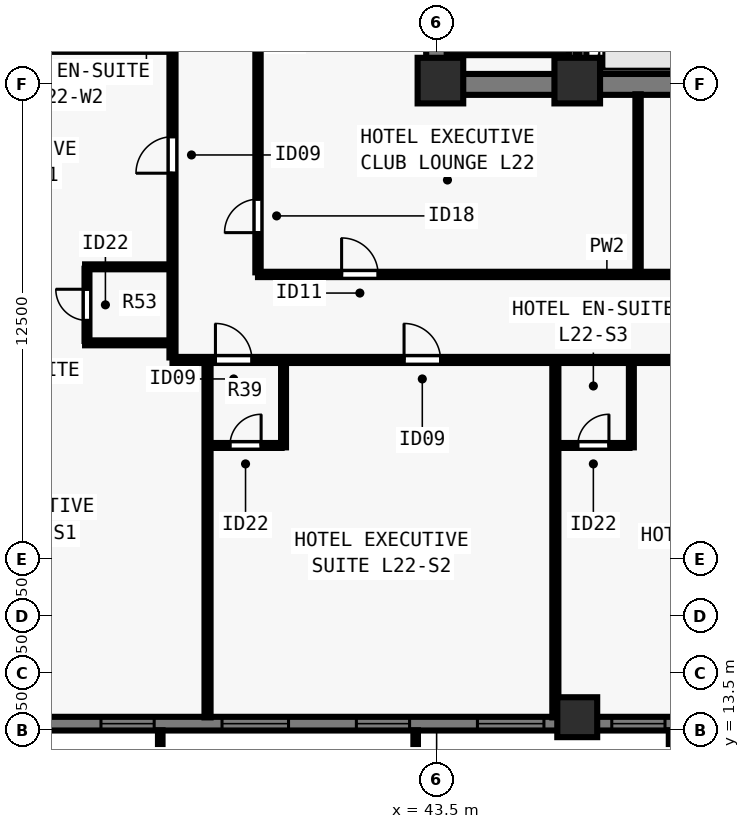
"""IFC4 building model, lengths in metres.
Left out: names, types, materials, properties, quantities, classifications, styles, units other than length and angle.
Written with IfcOpenShell. Run it as: python <this file> out.ifc"""

import sys

from ifc_helpers import new_model, si_unit, direction, frame, frame_2d, origin, origin_2d, place, context, subcontext, project, spatial, rectangle, extrude, element, fill, save


model = new_model("IFC4")
c1 = context("Model", 3, precision=1e-05, world=origin(), true_north=direction((0.0, 1.0)))
c2 = subcontext(c1, "Body", "Model", "MODEL_VIEW")
j1 = project(units=[si_unit("LENGTHUNIT", "METRE"), si_unit("PLANEANGLEUNIT", "RADIAN")], contexts=[c1])
p1 = place(None, origin())
s1 = spatial("IfcSite", under=j1, at=p1, CompositionType="ELEMENT")
p2 = place(p1, origin())
s2 = spatial("IfcBuilding", under=s1, at=p2, CompositionType="ELEMENT")
p3 = place(p2, frame((0.0, 0.0, 83.0)))
s3 = spatial("IfcBuildingStorey", under=s2, at=p3, CompositionType="ELEMENT", Elevation=83.0)
for number, where, z_axis, x_axis in (
    (1, (43.6, 30.6, 0.0), (0.0, 0.0, 1.0), (1.0, 0.0, 0.0)),
    (2, (47.2, 30.6, 0.0), (0.0, 0.0, 1.0), (1.0, 0.0, 0.0)),
):
    element("IfcColumn", number, at=place(p3, frame(where, z_axis=z_axis, x_axis=x_axis)), inside=s3, PredefinedType="COLUMN", context=c2, shape_type="SweptSolid", body=[
        extrude(rectangle(XDim=1.2, YDim=1.2, at=origin_2d()), origin(), (0.0, 0.0, 1.0), 3.5),
    ])
p4 = place(p3, frame((47.2, 13.85, 0.0), z_axis=(0.0, 0.0, 1.0), x_axis=(1.0, 0.0, 0.0)))
e3 = element("IfcColumn", 3, at=p4, inside=s3, PredefinedType="COLUMN", context=c2, shape_type="SweptSolid", body=[
    extrude(rectangle(XDim=1.05, YDim=1.05, at=origin_2d()), origin(), (0.0, 0.0, 1.0), 3.5),
])
p5 = place(p3, frame((74.5, 13.68, 0.0), z_axis=(0.0, 0.0, 1.0), x_axis=(-1.0, 0.0, 0.0)))
e4 = element("IfcWall", 4, at=p5, inside=s3, PredefinedType="SOLIDWALL", context=c2, shape_type="SweptSolid", body=[
    extrude(rectangle(XDim=44.662, YDim=0.36, at=frame_2d((22.331, 0.0))), origin(), (0.0, 0.0, 1.0), 3.28),
])
p6 = place(p5, frame((4.83, 0.0, 0.8)))
e5 = element("IfcOpeningElement", 5, at=p6, cuts=e4, PredefinedType="OPENING", context=c2, shape_type="SweptSolid", body=[
    extrude(rectangle(XDim=1.4, YDim=1.544, at=frame_2d((0.7, 0.772))), frame((0.0, 0.19, 0.0), z_axis=(0.0, -1.0, 0.0), x_axis=(1.0, 0.0, 0.0)), (0.0, 0.0, 1.0), 0.38),
])
p7 = place(p5, frame((8.465, 0.0, 0.8)))
e6 = element("IfcOpeningElement", 6, at=p7, cuts=e4, PredefinedType="OPENING", context=c2, shape_type="SweptSolid", body=[
    extrude(rectangle(XDim=1.75, YDim=1.544, at=frame_2d((0.875, 0.772))), frame((0.0, 0.19, 0.0), z_axis=(0.0, -1.0, 0.0), x_axis=(1.0, 0.0, 0.0)), (0.0, 0.0, 1.0), 0.38),
])
p8 = place(p5, frame((11.551, 0.0, 0.8)))
e7 = element("IfcOpeningElement", 7, at=p8, cuts=e4, PredefinedType="OPENING", context=c2, shape_type="SweptSolid", body=[
    extrude(rectangle(XDim=1.4, YDim=1.544, at=frame_2d((0.7, 0.772))), frame((0.0, 0.19, 0.0), z_axis=(0.0, -1.0, 0.0), x_axis=(1.0, 0.0, 0.0)), (0.0, 0.0, 1.0), 0.38),
])
p9 = place(p5, frame((14.736, 0.0, 0.8)))
e8 = element("IfcOpeningElement", 8, at=p9, cuts=e4, PredefinedType="OPENING", context=c2, shape_type="SweptSolid", body=[
    extrude(rectangle(XDim=1.75, YDim=1.544, at=frame_2d((0.875, 0.772))), frame((0.0, 0.19, 0.0), z_axis=(0.0, -1.0, 0.0), x_axis=(1.0, 0.0, 0.0)), (0.0, 0.0, 1.0), 0.38),
])
p10 = place(p5, frame((18.721, 0.0, 0.8)))
e9 = element("IfcOpeningElement", 9, at=p10, cuts=e4, PredefinedType="OPENING", context=c2, shape_type="SweptSolid", body=[
    extrude(rectangle(XDim=1.4, YDim=1.544, at=frame_2d((0.7, 0.772))), frame((0.0, 0.19, 0.0), z_axis=(0.0, -1.0, 0.0), x_axis=(1.0, 0.0, 0.0)), (0.0, 0.0, 1.0), 0.38),
])
p11 = place(p5, frame((21.456, 0.0, 0.8)))
e10 = element("IfcOpeningElement", 10, at=p11, cuts=e4, PredefinedType="OPENING", context=c2, shape_type="SweptSolid", body=[
    extrude(rectangle(XDim=1.75, YDim=1.544, at=frame_2d((0.875, 0.772))), frame((0.0, 0.19, 0.0), z_axis=(0.0, -1.0, 0.0), x_axis=(1.0, 0.0, 0.0)), (0.0, 0.0, 1.0), 0.38),
])
p12 = place(p5, frame((24.991, 0.0, 0.8)))
e11 = element("IfcOpeningElement", 11, at=p12, cuts=e4, PredefinedType="OPENING", context=c2, shape_type="SweptSolid", body=[
    extrude(rectangle(XDim=1.4, YDim=1.544, at=frame_2d((0.7, 0.772))), frame((0.0, 0.19, 0.0), z_axis=(0.0, -1.0, 0.0), x_axis=(1.0, 0.0, 0.0)), (0.0, 0.0, 1.0), 0.38),
])
p13 = place(p5, frame((28.177, 0.0, 0.8)))
e12 = element("IfcOpeningElement", 12, at=p13, cuts=e4, PredefinedType="OPENING", context=c2, shape_type="SweptSolid", body=[
    extrude(rectangle(XDim=1.75, YDim=1.544, at=frame_2d((0.875, 0.772))), frame((0.0, 0.19, 0.0), z_axis=(0.0, -1.0, 0.0), x_axis=(1.0, 0.0, 0.0)), (0.0, 0.0, 1.0), 0.38),
])
p14 = place(p5, frame((31.711, 0.0, 0.8)))
e13 = element("IfcOpeningElement", 13, at=p14, cuts=e4, PredefinedType="OPENING", context=c2, shape_type="SweptSolid", body=[
    extrude(rectangle(XDim=1.4, YDim=1.544, at=frame_2d((0.7, 0.772))), frame((0.0, 0.19, 0.0), z_axis=(0.0, -1.0, 0.0), x_axis=(1.0, 0.0, 0.0)), (0.0, 0.0, 1.0), 0.38),
])
p15 = place(p5, frame((34.897, 0.0, 0.8)))
e14 = element("IfcOpeningElement", 14, at=p15, cuts=e4, PredefinedType="OPENING", context=c2, shape_type="SweptSolid", body=[
    extrude(rectangle(XDim=1.75, YDim=1.544, at=frame_2d((0.875, 0.772))), frame((0.0, 0.19, 0.0), z_axis=(0.0, -1.0, 0.0), x_axis=(1.0, 0.0, 0.0)), (0.0, 0.0, 1.0), 0.38),
])
p16 = place(p5, frame((38.432, 0.0, 0.8)))
e15 = element("IfcOpeningElement", 15, at=p16, cuts=e4, PredefinedType="OPENING", context=c2, shape_type="SweptSolid", body=[
    extrude(rectangle(XDim=1.4, YDim=1.544, at=frame_2d((0.7, 0.772))), frame((0.0, 0.19, 0.0), z_axis=(0.0, -1.0, 0.0), x_axis=(1.0, 0.0, 0.0)), (0.0, 0.0, 1.0), 0.38),
])
p17 = place(p3, frame((43.225, 30.5, 0.0), z_axis=(0.0, 0.0, 1.0), x_axis=(1.0, 0.0, 0.0)))
e16 = element("IfcWall", 16, at=p17, inside=s3, PredefinedType="SHEAR", context=c2, shape_type="SweptSolid", body=[
    extrude(rectangle(XDim=17.55, YDim=0.55, at=frame_2d((8.775, 0.0))), origin(), (0.0, 0.0, 1.0), 3.28),
])
p18 = place(p3, frame((43.5, 30.765, 0.0), z_axis=(0.0, 0.0, 1.0), x_axis=(0.0, 1.0, 0.0)))
e17 = element("IfcWall", 17, at=p18, inside=s3, PredefinedType="SHEAR", context=c2, shape_type="SweptSolid", body=[
    extrude(rectangle(XDim=7.985, YDim=0.55, at=frame_2d((3.993, 0.0))), origin(), (0.0, 0.0, 1.0), 3.28),
])
p19 = place(p3, frame((47.35, 30.76, 0.0), z_axis=(0.0, 0.0, 1.0), x_axis=(0.0, 1.0, 0.0)))
e18 = element("IfcWall", 18, at=p19, inside=s3, PredefinedType="SOLIDWALL", context=c2, shape_type="SweptSolid", body=[
    extrude(rectangle(XDim=7.855, YDim=0.18, at=frame_2d((3.927, 0.0))), origin(), (0.0, 0.0, 1.0), 3.28),
])
p20 = place(p3, frame((36.55, 23.25, 0.0), z_axis=(0.0, 0.0, 1.0), x_axis=(1.0, 0.0, 0.0)))
e19 = element("IfcWall", 19, at=p20, inside=s3, PredefinedType="PARTITIONING", context=c2, shape_type="SweptSolid", body=[
    extrude(rectangle(XDim=30.9, YDim=0.16, at=frame_2d((15.45, 0.0))), origin(), (0.0, 0.0, 1.0), 3.28),
])
p21 = place(p20, frame((1.13, 0.0, 0.0)))
e20 = element("IfcOpeningElement", 20, at=p21, cuts=e19, PredefinedType="OPENING", context=c2, shape_type="SweptSolid", body=[
    extrude(rectangle(XDim=0.96, YDim=2.15, at=frame_2d((0.48, 1.075))), frame((0.0, 0.09, 0.0), z_axis=(0.0, -1.0, 0.0), x_axis=(1.0, 0.0, 0.0)), (0.0, 0.0, 1.0), 0.18),
])
p22 = place(p20, frame((6.093, 0.0, 0.0)))
e21 = element("IfcOpeningElement", 21, at=p22, cuts=e19, PredefinedType="OPENING", context=c2, shape_type="SweptSolid", body=[
    extrude(rectangle(XDim=0.96, YDim=2.15, at=frame_2d((0.48, 1.075))), frame((0.0, 0.09, 0.0), z_axis=(0.0, -1.0, 0.0), x_axis=(1.0, 0.0, 0.0)), (0.0, 0.0, 1.0), 0.18),
])
p23 = place(p20, frame((16.125, 0.0, 0.0)))
e22 = element("IfcOpeningElement", 22, at=p23, cuts=e19, PredefinedType="OPENING", context=c2, shape_type="SweptSolid", body=[
    extrude(rectangle(XDim=0.96, YDim=2.15, at=frame_2d((0.48, 1.075))), frame((0.0, 0.09, 0.0), z_axis=(0.0, -1.0, 0.0), x_axis=(1.0, 0.0, 0.0)), (0.0, 0.0, 1.0), 0.18),
])
p24 = place(p20, frame((26.157, 0.0, 0.0)))
e23 = element("IfcOpeningElement", 23, at=p24, cuts=e19, PredefinedType="OPENING", context=c2, shape_type="SweptSolid", body=[
    extrude(rectangle(XDim=0.96, YDim=2.15, at=frame_2d((0.48, 1.075))), frame((0.0, 0.09, 0.0), z_axis=(0.0, -1.0, 0.0), x_axis=(1.0, 0.0, 0.0)), (0.0, 0.0, 1.0), 0.18),
])
p25 = place(p20, frame((28.92, 0.0, 0.0)))
e24 = element("IfcOpeningElement", 24, at=p25, cuts=e19, PredefinedType="OPENING", context=c2, shape_type="SweptSolid", body=[
    extrude(rectangle(XDim=0.96, YDim=2.15, at=frame_2d((0.48, 1.075))), frame((0.0, 0.09, 0.0), z_axis=(0.0, -1.0, 0.0), x_axis=(1.0, 0.0, 0.0)), (0.0, 0.0, 1.0), 0.18),
])
p26 = place(p3, frame((36.55, 23.315, 0.0), z_axis=(0.0, 0.0, 1.0), x_axis=(0.0, 1.0, 0.0)))
e25 = element("IfcWall", 25, at=p26, inside=s3, PredefinedType="PARTITIONING", context=c2, shape_type="SweptSolid", body=[
    extrude(rectangle(XDim=31.37, YDim=0.16, at=frame_2d((15.685, 0.0))), origin(), (0.0, 0.0, 1.0), 3.28),
])
p27 = place(p26, frame((4.848, 0.0, 0.0)))
e26 = element("IfcOpeningElement", 26, at=p27, cuts=e25, PredefinedType="OPENING", context=c2, shape_type="SweptSolid", body=[
    extrude(rectangle(XDim=0.96, YDim=2.15, at=frame_2d((0.48, 1.075))), frame((0.0, 0.09, 0.0), z_axis=(0.0, -1.0, 0.0), x_axis=(1.0, 0.0, 0.0)), (0.0, 0.0, 1.0), 0.18),
])
p28 = place(p26, frame((12.39, 0.0, 0.0)))
e27 = element("IfcOpeningElement", 27, at=p28, cuts=e25, PredefinedType="OPENING", context=c2, shape_type="SweptSolid", body=[
    extrude(rectangle(XDim=0.96, YDim=2.15, at=frame_2d((0.48, 1.075))), frame((0.0, 0.09, 0.0), z_axis=(0.0, -1.0, 0.0), x_axis=(1.0, 0.0, 0.0)), (0.0, 0.0, 1.0), 0.18),
])
p29 = place(p26, frame((20.265, 0.0, 0.0)))
e28 = element("IfcOpeningElement", 28, at=p29, cuts=e25, PredefinedType="OPENING", context=c2, shape_type="SweptSolid", body=[
    extrude(rectangle(XDim=0.96, YDim=2.15, at=frame_2d((0.48, 1.075))), frame((0.0, 0.09, 0.0), z_axis=(0.0, -1.0, 0.0), x_axis=(1.0, 0.0, 0.0)), (0.0, 0.0, 1.0), 0.18),
])
p30 = place(p26, frame((28.223, 0.0, 0.0)))
e29 = element("IfcOpeningElement", 29, at=p30, cuts=e25, PredefinedType="OPENING", context=c2, shape_type="SweptSolid", body=[
    extrude(rectangle(XDim=0.96, YDim=2.15, at=frame_2d((0.48, 1.075))), frame((0.0, 0.09, 0.0), z_axis=(0.0, -1.0, 0.0), x_axis=(1.0, 0.0, 0.0)), (0.0, 0.0, 1.0), 0.18),
])
p31 = place(p3, frame((38.8, 25.5, 0.0), z_axis=(0.0, 0.0, 1.0), x_axis=(1.0, 0.0, 0.0)))
e30 = element("IfcWall", 30, at=p31, inside=s3, PredefinedType="PARTITIONING", context=c2, shape_type="SweptSolid", body=[
    extrude(rectangle(XDim=26.4, YDim=0.14, at=frame_2d((13.2, 0.0))), origin(), (0.0, 0.0, 1.0), 3.28),
])
p32 = place(p31, frame((2.2, 0.0, 0.0)))
e31 = element("IfcOpeningElement", 31, at=p32, cuts=e30, PredefinedType="OPENING", context=c2, shape_type="SweptSolid", body=[
    extrude(rectangle(XDim=0.96, YDim=2.12, at=frame_2d((0.48, 1.06))), frame((0.0, 0.08, 0.0), z_axis=(0.0, -1.0, 0.0), x_axis=(1.0, 0.0, 0.0)), (0.0, 0.0, 1.0), 0.16),
])
p33 = place(p31, frame((15.2, 0.0, 0.0)))
e32 = element("IfcOpeningElement", 32, at=p33, cuts=e30, PredefinedType="OPENING", context=c2, shape_type="SweptSolid", body=[
    extrude(rectangle(XDim=0.96, YDim=2.12, at=frame_2d((0.48, 1.06))), frame((0.0, 0.08, 0.0), z_axis=(0.0, -1.0, 0.0), x_axis=(1.0, 0.0, 0.0)), (0.0, 0.0, 1.0), 0.16),
])
p34 = place(p3, frame((38.8, 25.555, 0.0), z_axis=(0.0, 0.0, 1.0), x_axis=(0.0, 1.0, 0.0)))
e33 = element("IfcWall", 33, at=p34, inside=s3, PredefinedType="PARTITIONING", context=c2, shape_type="SweptSolid", body=[
    extrude(rectangle(XDim=13.195, YDim=0.14, at=frame_2d((6.598, 0.0))), origin(), (0.0, 0.0, 1.0), 3.28),
])
p35 = place(p34, frame((1.045, 0.0, 0.0)))
e34 = element("IfcOpeningElement", 34, at=p35, cuts=e33, PredefinedType="OPENING", context=c2, shape_type="SweptSolid", body=[
    extrude(rectangle(XDim=0.88, YDim=2.1, at=frame_2d((0.44, 1.05))), frame((0.0, 0.08, 0.0), z_axis=(0.0, -1.0, 0.0), x_axis=(1.0, 0.0, 0.0)), (0.0, 0.0, 1.0), 0.16),
])
p36 = place(p34, frame((10.245, 0.0, 0.0)))
e35 = element("IfcOpeningElement", 35, at=p36, cuts=e33, PredefinedType="OPENING", context=c2, shape_type="SweptSolid", body=[
    extrude(rectangle(XDim=0.88, YDim=2.1, at=frame_2d((0.44, 1.05))), frame((0.0, 0.08, 0.0), z_axis=(0.0, -1.0, 0.0), x_axis=(1.0, 0.0, 0.0)), (0.0, 0.0, 1.0), 0.16),
])
p37 = place(p3, frame((48.8, 25.555, 0.0), z_axis=(0.0, 0.0, 1.0), x_axis=(0.0, 1.0, 0.0)))
e36 = element("IfcWall", 36, at=p37, inside=s3, PredefinedType="PARTITIONING", context=c2, shape_type="SweptSolid", body=[
    extrude(rectangle(XDim=4.685, YDim=0.14, at=frame_2d((2.343, 0.0))), origin(), (0.0, 0.0, 1.0), 3.28),
])
p38 = place(p3, frame((37.472, 13.845, 0.0), z_axis=(0.0, 0.0, 1.0), x_axis=(0.0, 1.0, 0.0)))
e37 = element("IfcWall", 37, at=p38, inside=s3, PredefinedType="PARTITIONING", context=c2, shape_type="SweptSolid", body=[
    extrude(rectangle(XDim=9.34, YDim=0.16, at=frame_2d((4.67, 0.0))), origin(), (0.0, 0.0, 1.0), 3.28),
])
p39 = place(p3, frame((39.472, 20.95, 0.0), z_axis=(0.0, 0.0, 1.0), x_axis=(0.0, 1.0, 0.0)))
e38 = element("IfcWall", 38, at=p39, inside=s3, PredefinedType="PLUMBINGWALL", context=c2, shape_type="SweptSolid", body=[
    extrude(rectangle(XDim=2.235, YDim=0.13, at=frame_2d((1.118, 0.0))), origin(), (0.0, 0.0, 1.0), 3.28),
])
p40 = place(p3, frame((37.537, 21.0, 0.0), z_axis=(0.0, 0.0, 1.0), x_axis=(1.0, 0.0, 0.0)))
e39 = element("IfcWall", 39, at=p40, inside=s3, PredefinedType="PLUMBINGWALL", context=c2, shape_type="SweptSolid", body=[
    extrude(rectangle(XDim=1.885, YDim=0.13, at=frame_2d((0.942, 0.0))), origin(), (0.0, 0.0, 1.0), 3.28),
])
p41 = place(p40, frame((0.525, 0.0, 0.0)))
e40 = element("IfcOpeningElement", 40, at=p41, cuts=e39, PredefinedType="OPENING", context=c2, shape_type="SweptSolid", body=[
    extrude(rectangle(XDim=0.82, YDim=2.1, at=frame_2d((0.41, 1.05))), frame((0.0, 0.075, 0.0), z_axis=(0.0, -1.0, 0.0), x_axis=(1.0, 0.0, 0.0)), (0.0, 0.0, 1.0), 0.15),
])
p42 = place(p3, frame((46.624, 13.845, 0.0), z_axis=(0.0, 0.0, 1.0), x_axis=(0.0, 1.0, 0.0)))
e41 = element("IfcWall", 41, at=p42, inside=s3, PredefinedType="PARTITIONING", context=c2, shape_type="SweptSolid", body=[
    extrude(rectangle(XDim=9.34, YDim=0.16, at=frame_2d((4.67, 0.0))), origin(), (0.0, 0.0, 1.0), 3.28),
])
p43 = place(p3, frame((48.624, 20.95, 0.0), z_axis=(0.0, 0.0, 1.0), x_axis=(0.0, 1.0, 0.0)))
e42 = element("IfcWall", 42, at=p43, inside=s3, PredefinedType="PLUMBINGWALL", context=c2, shape_type="SweptSolid", body=[
    extrude(rectangle(XDim=2.235, YDim=0.13, at=frame_2d((1.118, 0.0))), origin(), (0.0, 0.0, 1.0), 3.28),
])
p44 = place(p3, frame((46.689, 21.0, 0.0), z_axis=(0.0, 0.0, 1.0), x_axis=(1.0, 0.0, 0.0)))
e43 = element("IfcWall", 43, at=p44, inside=s3, PredefinedType="PLUMBINGWALL", context=c2, shape_type="SweptSolid", body=[
    extrude(rectangle(XDim=1.885, YDim=0.13, at=frame_2d((0.942, 0.0))), origin(), (0.0, 0.0, 1.0), 3.28),
])
p45 = place(p44, frame((0.525, 0.0, 0.0)))
e44 = element("IfcOpeningElement", 44, at=p45, cuts=e43, PredefinedType="OPENING", context=c2, shape_type="SweptSolid", body=[
    extrude(rectangle(XDim=0.82, YDim=2.1, at=frame_2d((0.41, 1.05))), frame((0.0, 0.075, 0.0), z_axis=(0.0, -1.0, 0.0), x_axis=(1.0, 0.0, 0.0)), (0.0, 0.0, 1.0), 0.15),
])
p46 = place(p3, frame((34.25, 23.7, 0.0), z_axis=(0.0, 0.0, 1.0), x_axis=(1.0, 0.0, 0.0)))
e45 = element("IfcWall", 45, at=p46, inside=s3, PredefinedType="PLUMBINGWALL", context=c2, shape_type="SweptSolid", body=[
    extrude(rectangle(XDim=2.235, YDim=0.13, at=frame_2d((1.118, 0.0))), origin(), (0.0, 0.0, 1.0), 2.849),
])
p47 = place(p3, frame((34.25, 25.7, 0.0), z_axis=(0.0, 0.0, 1.0), x_axis=(1.0, 0.0, 0.0)))
e46 = element("IfcWall", 46, at=p47, inside=s3, PredefinedType="PLUMBINGWALL", context=c2, shape_type="SweptSolid", body=[
    extrude(rectangle(XDim=2.235, YDim=0.13, at=frame_2d((1.118, 0.0))), origin(), (0.0, 0.0, 1.0), 3.28),
])
p48 = place(p3, frame((34.3, 23.75, 0.0), z_axis=(0.0, 0.0, 1.0), x_axis=(0.0, 1.0, 0.0)))
e47 = element("IfcWall", 47, at=p48, inside=s3, PredefinedType="PLUMBINGWALL", context=c2, shape_type="SweptSolid", body=[
    extrude(rectangle(XDim=1.9, YDim=0.13, at=frame_2d((0.95, 0.0))), origin(), (0.0, 0.0, 1.0), 3.28),
])
p49 = place(p48, frame((0.54, 0.0, 0.0)))
e48 = element("IfcOpeningElement", 48, at=p49, cuts=e47, PredefinedType="OPENING", context=c2, shape_type="SweptSolid", body=[
    extrude(rectangle(XDim=0.82, YDim=2.1, at=frame_2d((0.41, 1.05))), frame((0.0, 0.075, 0.0), z_axis=(0.0, -1.0, 0.0), x_axis=(1.0, 0.0, 0.0)), (0.0, 0.0, 1.0), 0.15),
])
p50 = place(p3, frame((43.765, 31.36, 0.0), z_axis=(0.0, 0.0, 1.0), x_axis=(1.0, 0.0, 0.0)))
e49 = element("IfcWall", 49, at=p50, inside=s3, PredefinedType="SOLIDWALL", context=c2, shape_type="SweptSolid", body=[
    extrude(rectangle(XDim=3.23, YDim=0.18, at=frame_2d((1.615, 0.0))), origin(), (0.0, 0.0, 1.0), 3.28),
])
p51 = place(p3, frame((47.07, 38.78, 0.0), z_axis=(0.0, 0.0, 1.0), x_axis=(0.0, -1.0, 0.0)))
e50 = element("IfcWall", 50, at=p51, inside=s3, PredefinedType="SOLIDWALL", context=c2, shape_type="SweptSolid", body=[
    extrude(rectangle(XDim=8.017, YDim=0.18, at=frame_2d((4.009, 0.0))), origin(), (0.0, 0.0, 1.0), 3.28),
])
p52 = place(p12, origin())
e51 = element("IfcWindow", 51, at=p52, inside=s3, PartitioningType="SINGLE_PANEL", PredefinedType="WINDOW", context=c2, shape_type="SweptSolid", body=[
    extrude(rectangle(XDim=1.4, YDim=1.544, at=frame_2d((0.7, 0.772))), frame((0.0, -0.05, 0.0), z_axis=(0.0, -1.0, 0.0), x_axis=(1.0, 0.0, 0.0)), (0.0, 0.0, 1.0), 0.06),
])
fill(e11, e51)
p53 = place(p13, origin())
e52 = element("IfcWindow", 52, at=p53, inside=s3, PartitioningType="SINGLE_PANEL", PredefinedType="WINDOW", context=c2, shape_type="SweptSolid", body=[
    extrude(rectangle(XDim=1.75, YDim=1.544, at=frame_2d((0.875, 0.772))), frame((0.0, -0.05, 0.0), z_axis=(0.0, -1.0, 0.0), x_axis=(1.0, 0.0, 0.0)), (0.0, 0.0, 1.0), 0.06),
])
fill(e12, e52)
p54 = place(p14, origin())
e53 = element("IfcWindow", 53, at=p54, inside=s3, PartitioningType="SINGLE_PANEL", PredefinedType="WINDOW", context=c2, shape_type="SweptSolid", body=[
    extrude(rectangle(XDim=1.4, YDim=1.544, at=frame_2d((0.7, 0.772))), frame((0.0, -0.05, 0.0), z_axis=(0.0, -1.0, 0.0), x_axis=(1.0, 0.0, 0.0)), (0.0, 0.0, 1.0), 0.06),
])
fill(e13, e53)
p55 = place(p15, origin())
e54 = element("IfcWindow", 54, at=p55, inside=s3, PartitioningType="SINGLE_PANEL", PredefinedType="WINDOW", context=c2, shape_type="SweptSolid", body=[
    extrude(rectangle(XDim=1.75, YDim=1.544, at=frame_2d((0.875, 0.772))), frame((0.0, -0.05, 0.0), z_axis=(0.0, -1.0, 0.0), x_axis=(1.0, 0.0, 0.0)), (0.0, 0.0, 1.0), 0.06),
])
fill(e14, e54)
p56 = place(p16, origin())
e55 = element("IfcWindow", 55, at=p56, inside=s3, PartitioningType="SINGLE_PANEL", PredefinedType="WINDOW", context=c2, shape_type="SweptSolid", body=[
    extrude(rectangle(XDim=1.4, YDim=1.544, at=frame_2d((0.7, 0.772))), frame((0.0, -0.05, 0.0), z_axis=(0.0, -1.0, 0.0), x_axis=(1.0, 0.0, 0.0)), (0.0, 0.0, 1.0), 0.06),
])
fill(e15, e55)
p57 = place(p32, origin())
e56 = element("IfcDoor", 56, at=p57, inside=s3, OperationType="SINGLE_SWING_LEFT", PredefinedType="DOOR", context=c2, shape_type="SweptSolid", body=[
    extrude(rectangle(XDim=0.96, YDim=2.12, at=frame_2d((0.48, 1.06))), frame((0.0, 0.025, 0.0), z_axis=(0.0, -1.0, 0.0), x_axis=(1.0, 0.0, 0.0)), (0.0, 0.0, 1.0), 0.05),
])
fill(e31, e56)
p58 = place(p35, origin())
e57 = element("IfcDoor", 57, at=p58, inside=s3, OperationType="SINGLE_SWING_LEFT", PredefinedType="DOOR", context=c2, shape_type="SweptSolid", body=[
    extrude(rectangle(XDim=0.88, YDim=2.1, at=frame_2d((0.44, 1.05))), frame((0.0, 0.025, 0.0), z_axis=(0.0, -1.0, 0.0), x_axis=(1.0, 0.0, 0.0)), (0.0, 0.0, 1.0), 0.05),
])
fill(e34, e57)
p59 = place(p21, origin())
e58 = element("IfcDoor", 58, at=p59, inside=s3, OperationType="SINGLE_SWING_LEFT", PredefinedType="DOOR", context=c2, shape_type="SweptSolid", body=[
    extrude(rectangle(XDim=0.96, YDim=2.15, at=frame_2d((0.48, 1.075))), frame((0.0, 0.025, 0.0), z_axis=(0.0, -1.0, 0.0), x_axis=(1.0, 0.0, 0.0)), (0.0, 0.0, 1.0), 0.05),
])
fill(e20, e58)
p60 = place(p41, origin())
e59 = element("IfcDoor", 59, at=p60, inside=s3, OperationType="SINGLE_SWING_RIGHT", PredefinedType="DOOR", context=c2, shape_type="SweptSolid", body=[
    extrude(rectangle(XDim=0.82, YDim=2.1, at=frame_2d((0.41, 1.05))), frame((0.0, 0.025, 0.0), z_axis=(0.0, -1.0, 0.0), x_axis=(1.0, 0.0, 0.0)), (0.0, 0.0, 1.0), 0.05),
])
fill(e40, e59)
p61 = place(p22, origin())
e60 = element("IfcDoor", 60, at=p61, inside=s3, OperationType="SINGLE_SWING_LEFT", PredefinedType="DOOR", context=c2, shape_type="SweptSolid", body=[
    extrude(rectangle(XDim=0.96, YDim=2.15, at=frame_2d((0.48, 1.075))), frame((0.0, 0.025, 0.0), z_axis=(0.0, -1.0, 0.0), x_axis=(1.0, 0.0, 0.0)), (0.0, 0.0, 1.0), 0.05),
])
fill(e21, e60)
p62 = place(p45, origin())
e61 = element("IfcDoor", 61, at=p62, inside=s3, OperationType="SINGLE_SWING_RIGHT", PredefinedType="DOOR", context=c2, shape_type="SweptSolid", body=[
    extrude(rectangle(XDim=0.82, YDim=2.1, at=frame_2d((0.41, 1.05))), frame((0.0, 0.025, 0.0), z_axis=(0.0, -1.0, 0.0), x_axis=(1.0, 0.0, 0.0)), (0.0, 0.0, 1.0), 0.05),
])
fill(e44, e61)
p63 = place(p49, origin())
e62 = element("IfcDoor", 62, at=p63, inside=s3, OperationType="SINGLE_SWING_RIGHT", PredefinedType="DOOR", context=c2, shape_type="SweptSolid", body=[
    extrude(rectangle(XDim=0.82, YDim=2.1, at=frame_2d((0.41, 1.05))), frame((0.0, 0.025, 0.0), z_axis=(0.0, -1.0, 0.0), x_axis=(1.0, 0.0, 0.0)), (0.0, 0.0, 1.0), 0.05),
])
fill(e48, e62)
p64 = place(p27, origin())
e63 = element("IfcDoor", 63, at=p64, inside=s3, OperationType="SINGLE_SWING_LEFT", PredefinedType="DOOR", context=c2, shape_type="SweptSolid", body=[
    extrude(rectangle(XDim=0.96, YDim=2.15, at=frame_2d((0.48, 1.075))), frame((0.0, 0.025, 0.0), z_axis=(0.0, -1.0, 0.0), x_axis=(1.0, 0.0, 0.0)), (0.0, 0.0, 1.0), 0.05),
])
fill(e26, e63)
save(model, sys.argv[1])
